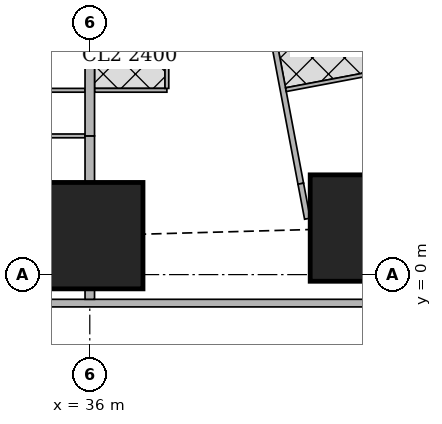
"""IFC4 building model, lengths in metres.
Left out: names, types, materials, properties, quantities, classifications, styles, units other than length and angle.
Written with IfcOpenShell. Run it as: python <this file> out.ifc"""

import sys

from ifc_helpers import new_model, si_unit, direction, frame, frame_2d, origin, origin_2d, place, context, subcontext, project, spatial, rectangle, extrude, element, fill, save


model = new_model("IFC4")
c1 = context("Model", 3, precision=1e-05, world=origin(), true_north=direction((0.0, 1.0)))
c2 = subcontext(c1, "Body", "Model", "MODEL_VIEW")
j1 = project(units=[si_unit("LENGTHUNIT", "METRE"), si_unit("PLANEANGLEUNIT", "RADIAN")], contexts=[c1])
p1 = place(None, origin())
s1 = spatial("IfcSite", under=j1, at=p1, CompositionType="ELEMENT")
p2 = place(p1, origin())
s2 = spatial("IfcBuilding", under=s1, at=p2, CompositionType="ELEMENT")
p3 = place(p2, frame((0.0, 0.0, 31.25)))
s3 = spatial("IfcBuildingStorey", under=s2, at=p3, CompositionType="ELEMENT", Elevation=31.25)
for number, where, z_axis, x_axis in (
    (1, (36.0, 1.025, 0.0), (0.0, 0.0, 1.0), (1.0, 0.0, 0.0)),
    (2, (43.2, 1.225, 0.0), (0.0, 0.0, 1.0), (1.0, 0.0, 0.0)),
):
    element("IfcColumn", number, at=place(p3, frame(where, z_axis=z_axis, x_axis=x_axis)), inside=s3, PredefinedType="COLUMN", context=c2, shape_type="SweptSolid", body=[
        extrude(rectangle(XDim=2.8, YDim=2.8, at=origin_2d()), origin(), (0.0, 0.0, 1.0), 3.75),
    ])
p4 = place(p3, frame((2.163, -0.75, 0.0), z_axis=(0.0, 0.0, 1.0), x_axis=(1.0, 0.0, 0.0)))
e3 = element("IfcWall", 3, at=p4, inside=s3, PredefinedType="SOLIDWALL", context=c2, shape_type="SweptSolid", body=[
    extrude(rectangle(XDim=45.628, YDim=0.2, at=frame_2d((22.814, 0.0))), origin(), (0.0, 0.0, 1.0), 3.5),
])
p5 = place(p4, frame((9.537, 0.0, 0.9)))
e4 = element("IfcOpeningElement", 4, at=p5, cuts=e3, PredefinedType="OPENING", context=c2, shape_type="SweptSolid", body=[
    extrude(rectangle(XDim=1.8, YDim=1.5, at=frame_2d((0.9, 0.75))), frame((0.0, 0.11, 0.0), z_axis=(0.0, -1.0, 0.0), x_axis=(1.0, 0.0, 0.0)), (0.0, 0.0, 1.0), 0.22),
])
p6 = place(p4, frame((13.137, 0.0, 0.9)))
e5 = element("IfcOpeningElement", 5, at=p6, cuts=e3, PredefinedType="OPENING", context=c2, shape_type="SweptSolid", body=[
    extrude(rectangle(XDim=1.8, YDim=1.5, at=frame_2d((0.9, 0.75))), frame((0.0, 0.11, 0.0), z_axis=(0.0, -1.0, 0.0), x_axis=(1.0, 0.0, 0.0)), (0.0, 0.0, 1.0), 0.22),
])
p7 = place(p4, frame((16.737, 0.0, 0.9)))
e6 = element("IfcOpeningElement", 6, at=p7, cuts=e3, PredefinedType="OPENING", context=c2, shape_type="SweptSolid", body=[
    extrude(rectangle(XDim=1.8, YDim=1.5, at=frame_2d((0.9, 0.75))), frame((0.0, 0.11, 0.0), z_axis=(0.0, -1.0, 0.0), x_axis=(1.0, 0.0, 0.0)), (0.0, 0.0, 1.0), 0.22),
])
p8 = place(p4, frame((20.337, 0.0, 0.9)))
e7 = element("IfcOpeningElement", 7, at=p8, cuts=e3, PredefinedType="OPENING", context=c2, shape_type="SweptSolid", body=[
    extrude(rectangle(XDim=1.8, YDim=1.5, at=frame_2d((0.9, 0.75))), frame((0.0, 0.11, 0.0), z_axis=(0.0, -1.0, 0.0), x_axis=(1.0, 0.0, 0.0)), (0.0, 0.0, 1.0), 0.22),
])
p9 = place(p4, frame((23.937, 0.0, 0.9)))
e8 = element("IfcOpeningElement", 8, at=p9, cuts=e3, PredefinedType="OPENING", context=c2, shape_type="SweptSolid", body=[
    extrude(rectangle(XDim=1.8, YDim=1.5, at=frame_2d((0.9, 0.75))), frame((0.0, 0.11, 0.0), z_axis=(0.0, -1.0, 0.0), x_axis=(1.0, 0.0, 0.0)), (0.0, 0.0, 1.0), 0.22),
])
p10 = place(p4, frame((27.537, 0.0, 0.9)))
e9 = element("IfcOpeningElement", 9, at=p10, cuts=e3, PredefinedType="OPENING", context=c2, shape_type="SweptSolid", body=[
    extrude(rectangle(XDim=1.8, YDim=1.5, at=frame_2d((0.9, 0.75))), frame((0.0, 0.11, 0.0), z_axis=(0.0, -1.0, 0.0), x_axis=(1.0, 0.0, 0.0)), (0.0, 0.0, 1.0), 0.22),
])
p11 = place(p4, frame((31.137, 0.0, 0.9)))
e10 = element("IfcOpeningElement", 10, at=p11, cuts=e3, PredefinedType="OPENING", context=c2, shape_type="SweptSolid", body=[
    extrude(rectangle(XDim=1.8, YDim=1.5, at=frame_2d((0.9, 0.75))), frame((0.0, 0.11, 0.0), z_axis=(0.0, -1.0, 0.0), x_axis=(1.0, 0.0, 0.0)), (0.0, 0.0, 1.0), 0.22),
])
p12 = place(p4, frame((34.737, 0.0, 0.9)))
e11 = element("IfcOpeningElement", 11, at=p12, cuts=e3, PredefinedType="OPENING", context=c2, shape_type="SweptSolid", body=[
    extrude(rectangle(XDim=1.8, YDim=1.5, at=frame_2d((0.9, 0.75))), frame((0.0, 0.11, 0.0), z_axis=(0.0, -1.0, 0.0), x_axis=(1.0, 0.0, 0.0)), (0.0, 0.0, 1.0), 0.22),
])
p13 = place(p3, frame((50.653, 2.703, 0.0), z_axis=(0.0, 0.0, 1.0), x_axis=(-0.185612026696, 0.982623109613, 0.0)))
e12 = element("IfcWall", 12, at=p13, inside=s3, PredefinedType="SOLIDWALL", context=c2, shape_type="SweptSolid", body=[
    extrude(rectangle(XDim=41.393, YDim=0.2, at=frame_2d((20.697, 0.0))), origin(), (0.0, 0.0, 1.0), 3.5),
])
p14 = place(p13, frame((1.633, 0.0, 0.9)))
e13 = element("IfcOpeningElement", 13, at=p14, cuts=e12, PredefinedType="OPENING", context=c2, shape_type="SweptSolid", body=[
    extrude(rectangle(XDim=1.8, YDim=1.5, at=frame_2d((0.9, 0.75))), frame((0.0, 0.11, 0.0), z_axis=(0.0, -1.0, 0.0), x_axis=(1.0, 0.0, 0.0)), (0.0, 0.0, 1.0), 0.22),
])
p15 = place(p13, frame((6.032, 0.0, 0.9)))
e14 = element("IfcOpeningElement", 14, at=p15, cuts=e12, PredefinedType="OPENING", context=c2, shape_type="SweptSolid", body=[
    extrude(rectangle(XDim=1.8, YDim=1.5, at=frame_2d((0.9, 0.75))), frame((0.0, 0.11, 0.0), z_axis=(0.0, -1.0, 0.0), x_axis=(1.0, 0.0, 0.0)), (0.0, 0.0, 1.0), 0.22),
])
p16 = place(p13, frame((9.848, 0.0, 0.9)))
e15 = element("IfcOpeningElement", 15, at=p16, cuts=e12, PredefinedType="OPENING", context=c2, shape_type="SweptSolid", body=[
    extrude(rectangle(XDim=1.8, YDim=1.5, at=frame_2d((0.9, 0.75))), frame((0.0, 0.11, 0.0), z_axis=(0.0, -1.0, 0.0), x_axis=(1.0, 0.0, 0.0)), (0.0, 0.0, 1.0), 0.22),
])
p17 = place(p13, frame((17.481, 0.0, 0.9)))
e16 = element("IfcOpeningElement", 16, at=p17, cuts=e12, PredefinedType="OPENING", context=c2, shape_type="SweptSolid", body=[
    extrude(rectangle(XDim=1.8, YDim=1.5, at=frame_2d((0.9, 0.75))), frame((0.0, 0.11, 0.0), z_axis=(0.0, -1.0, 0.0), x_axis=(1.0, 0.0, 0.0)), (0.0, 0.0, 1.0), 0.22),
])
p18 = place(p13, frame((21.297, 0.0, 0.9)))
e17 = element("IfcOpeningElement", 17, at=p18, cuts=e12, PredefinedType="OPENING", context=c2, shape_type="SweptSolid", body=[
    extrude(rectangle(XDim=1.8, YDim=1.5, at=frame_2d((0.9, 0.75))), frame((0.0, 0.11, 0.0), z_axis=(0.0, -1.0, 0.0), x_axis=(1.0, 0.0, 0.0)), (0.0, 0.0, 1.0), 0.22),
])
p19 = place(p13, frame((25.113, 0.0, 0.9)))
e18 = element("IfcOpeningElement", 18, at=p19, cuts=e12, PredefinedType="OPENING", context=c2, shape_type="SweptSolid", body=[
    extrude(rectangle(XDim=1.8, YDim=1.5, at=frame_2d((0.9, 0.75))), frame((0.0, 0.11, 0.0), z_axis=(0.0, -1.0, 0.0), x_axis=(1.0, 0.0, 0.0)), (0.0, 0.0, 1.0), 0.22),
])
p20 = place(p13, frame((28.93, 0.0, 0.9)))
e19 = element("IfcOpeningElement", 19, at=p20, cuts=e12, PredefinedType="OPENING", context=c2, shape_type="SweptSolid", body=[
    extrude(rectangle(XDim=1.8, YDim=1.5, at=frame_2d((0.9, 0.75))), frame((0.0, 0.11, 0.0), z_axis=(0.0, -1.0, 0.0), x_axis=(1.0, 0.0, 0.0)), (0.0, 0.0, 1.0), 0.22),
])
p21 = place(p13, frame((32.746, 0.0, 0.9)))
e20 = element("IfcOpeningElement", 20, at=p21, cuts=e12, PredefinedType="OPENING", context=c2, shape_type="SweptSolid", body=[
    extrude(rectangle(XDim=1.8, YDim=1.5, at=frame_2d((0.9, 0.75))), frame((0.0, 0.11, 0.0), z_axis=(0.0, -1.0, 0.0), x_axis=(1.0, 0.0, 0.0)), (0.0, 0.0, 1.0), 0.22),
])
p22 = place(p13, frame((36.481, 0.0, 0.9)))
e21 = element("IfcOpeningElement", 21, at=p22, cuts=e12, PredefinedType="OPENING", context=c2, shape_type="SweptSolid", body=[
    extrude(rectangle(XDim=1.8, YDim=1.5, at=frame_2d((0.9, 0.75))), frame((0.0, 0.11, 0.0), z_axis=(0.0, -1.0, 0.0), x_axis=(1.0, 0.0, 0.0)), (0.0, 0.0, 1.0), 0.22),
])
p23 = place(p3, frame((35.094, 36.585, 0.0), z_axis=(0.0, 0.0, 1.0), x_axis=(0.185588860311, -0.982627485331, 0.0)))
e22 = element("IfcWall", 22, at=p23, inside=s3, PredefinedType="SOLIDWALL", context=c2, shape_type="SweptSolid", body=[
    extrude(rectangle(XDim=34.797, YDim=0.15, at=frame_2d((17.399, 0.0))), origin(), (0.0, 0.0, 1.0), 2.5),
])
p24 = place(p23, frame((6.012, 0.0, 0.0)))
e23 = element("IfcOpeningElement", 23, at=p24, cuts=e22, PredefinedType="OPENING", context=c2, shape_type="SweptSolid", body=[
    extrude(rectangle(XDim=1.0, YDim=2.1, at=frame_2d((0.5, 1.05))), frame((0.0, 0.085, 0.0), z_axis=(0.0, -1.0, 0.0), x_axis=(1.0, 0.0, 0.0)), (0.0, 0.0, 1.0), 0.17),
])
p25 = place(p23, frame((9.828, 0.0, 0.0)))
e24 = element("IfcOpeningElement", 24, at=p25, cuts=e22, PredefinedType="OPENING", context=c2, shape_type="SweptSolid", body=[
    extrude(rectangle(XDim=1.0, YDim=2.1, at=frame_2d((0.5, 1.05))), frame((0.0, 0.085, 0.0), z_axis=(0.0, -1.0, 0.0), x_axis=(1.0, 0.0, 0.0)), (0.0, 0.0, 1.0), 0.17),
])
p26 = place(p23, frame((25.9, 0.0, 0.0)))
e25 = element("IfcOpeningElement", 25, at=p26, cuts=e22, PredefinedType="OPENING", context=c2, shape_type="SweptSolid", body=[
    extrude(rectangle(XDim=1.0, YDim=2.1, at=frame_2d((0.5, 1.05))), frame((0.0, 0.085, 0.0), z_axis=(0.0, -1.0, 0.0), x_axis=(1.0, 0.0, 0.0)), (0.0, 0.0, 1.0), 0.17),
])
p27 = place(p3, frame((41.552, 2.392, 0.0), z_axis=(0.0, 0.0, 1.0), x_axis=(0.185687800081, -0.982608793417, 0.0)))
e26 = element("IfcWall", 26, at=p27, inside=s3, PredefinedType="SOLIDWALL", context=c2, shape_type="SweptSolid", body=[
    extrude(rectangle(XDim=0.938, YDim=0.15, at=frame_2d((0.469, 0.0))), origin(), (0.0, 0.0, 1.0), 2.05),
])
p28 = place(p3, frame((35.875, 3.65, 0.0), z_axis=(0.0, 0.0, 1.0), x_axis=(-1.0, 0.0, 0.0)))
e27 = element("IfcWall", 27, at=p28, inside=s3, PredefinedType="PARTITIONING", context=c2, shape_type="SweptSolid", body=[
    extrude(rectangle(XDim=7.075, YDim=0.1, at=frame_2d((3.538, 0.0))), origin(), (0.0, 0.0, 1.0), 3.5),
])
p29 = place(p28, frame((4.75, 0.0, 0.0)))
e28 = element("IfcOpeningElement", 28, at=p29, cuts=e27, PredefinedType="OPENING", context=c2, shape_type="SweptSolid", body=[
    extrude(rectangle(XDim=0.9, YDim=2.1, at=frame_2d((0.45, 1.05))), frame((0.0, 0.06, 0.0), z_axis=(0.0, -1.0, 0.0), x_axis=(1.0, 0.0, 0.0)), (0.0, 0.0, 1.0), 0.12),
])
p30 = place(p28, frame((2.375, 0.0, 0.0)))
e29 = element("IfcOpeningElement", 29, at=p30, cuts=e27, PredefinedType="OPENING", context=c2, shape_type="SweptSolid", body=[
    extrude(rectangle(XDim=0.9, YDim=2.1, at=frame_2d((0.45, 1.05))), frame((0.0, 0.06, 0.0), z_axis=(0.0, -1.0, 0.0), x_axis=(1.0, 0.0, 0.0)), (0.0, 0.0, 1.0), 0.12),
])
p31 = place(p3, frame((35.875, 4.85, 0.0), z_axis=(0.0, 0.0, 1.0), x_axis=(-1.0, 0.0, 0.0)))
e30 = element("IfcWall", 30, at=p31, inside=s3, PredefinedType="PARTITIONING", context=c2, shape_type="SweptSolid", body=[
    extrude(rectangle(XDim=7.075, YDim=0.1, at=frame_2d((3.538, 0.0))), origin(), (0.0, 0.0, 1.0), 3.5),
])
p32 = place(p31, frame((5.52, 0.0, 0.0)))
e31 = element("IfcOpeningElement", 31, at=p32, cuts=e30, PredefinedType="OPENING", context=c2, shape_type="SweptSolid", body=[
    extrude(rectangle(XDim=0.9, YDim=2.1, at=frame_2d((0.45, 1.05))), frame((0.0, 0.06, 0.0), z_axis=(0.0, -1.0, 0.0), x_axis=(1.0, 0.0, 0.0)), (0.0, 0.0, 1.0), 0.12),
])
p33 = place(p31, frame((2.225, 0.0, 0.0)))
e32 = element("IfcOpeningElement", 32, at=p33, cuts=e30, PredefinedType="OPENING", context=c2, shape_type="SweptSolid", body=[
    extrude(rectangle(XDim=0.9, YDim=2.1, at=frame_2d((0.45, 1.05))), frame((0.0, 0.06, 0.0), z_axis=(0.0, -1.0, 0.0), x_axis=(1.0, 0.0, 0.0)), (0.0, 0.0, 1.0), 0.12),
])
p34 = place(p31, frame((3.72, 0.0, 0.0)))
e33 = element("IfcOpeningElement", 33, at=p34, cuts=e30, PredefinedType="OPENING", context=c2, shape_type="SweptSolid", body=[
    extrude(rectangle(XDim=0.9, YDim=2.1, at=frame_2d((0.45, 1.05))), frame((0.0, 0.06, 0.0), z_axis=(0.0, -1.0, 0.0), x_axis=(1.0, 0.0, 0.0)), (0.0, 0.0, 1.0), 0.12),
])
p35 = place(p31, frame((0.425, 0.0, 0.0)))
e34 = element("IfcOpeningElement", 34, at=p35, cuts=e30, PredefinedType="OPENING", context=c2, shape_type="SweptSolid", body=[
    extrude(rectangle(XDim=0.9, YDim=2.1, at=frame_2d((0.45, 1.05))), frame((0.0, 0.06, 0.0), z_axis=(0.0, -1.0, 0.0), x_axis=(1.0, 0.0, 0.0)), (0.0, 0.0, 1.0), 0.12),
])
p36 = place(p3, frame((38.029, 4.85, 0.0), z_axis=(0.0, 0.0, 1.0), x_axis=(-1.0, 0.0, 0.0)))
e35 = element("IfcWall", 35, at=p36, inside=s3, PredefinedType="PARTITIONING", context=c2, shape_type="SweptSolid", body=[
    extrude(rectangle(XDim=1.904, YDim=0.1, at=frame_2d((0.952, 0.0))), origin(), (0.0, 0.0, 1.0), 3.5),
])
p37 = place(p36, frame((0.579, 0.0, 0.0)))
e36 = element("IfcOpeningElement", 36, at=p37, cuts=e35, PredefinedType="OPENING", context=c2, shape_type="SweptSolid", body=[
    extrude(rectangle(XDim=0.9, YDim=2.1, at=frame_2d((0.45, 1.05))), frame((0.0, 0.06, 0.0), z_axis=(0.0, -1.0, 0.0), x_axis=(1.0, 0.0, 0.0)), (0.0, 0.0, 1.0), 0.12),
])
p38 = place(p3, frame((38.029, 4.9, 0.0), z_axis=(0.0, 0.0, 1.0), x_axis=(0.0, 1.0, 0.0)))
e37 = element("IfcWall", 37, at=p38, inside=s3, PredefinedType="PARTITIONING", context=c2, shape_type="SweptSolid", body=[
    extrude(rectangle(XDim=3.275, YDim=0.1, at=frame_2d((1.638, 0.0))), origin(), (0.0, 0.0, 1.0), 3.5),
])
p39 = place(p3, frame((36.0, -0.65, 0.0), z_axis=(0.0, 0.0, 1.0), x_axis=(0.0, 1.0, 0.0)))
e38 = element("IfcWall", 38, at=p39, inside=s3, PredefinedType="SOLIDWALL", context=c2, shape_type="SweptSolid", body=[
    extrude(rectangle(XDim=0.274, YDim=0.25, at=frame_2d((0.137, 0.0))), origin(), (0.0, 0.0, 1.0), 3.5),
])
p40 = place(p3, frame((36.0, 2.426, 0.0), z_axis=(0.0, 0.0, 1.0), x_axis=(0.0, 1.0, 0.0)))
e39 = element("IfcWall", 39, at=p40, inside=s3, PredefinedType="SOLIDWALL", context=c2, shape_type="SweptSolid", body=[
    extrude(rectangle(XDim=1.224, YDim=0.25, at=frame_2d((0.612, 0.0))), origin(), (0.0, 0.0, 1.0), 3.5),
])
p41 = place(p3, frame((36.0, 3.65, 0.0), z_axis=(0.0, 0.0, 1.0), x_axis=(0.0, 1.0, 0.0)))
e40 = element("IfcWall", 40, at=p41, inside=s3, PredefinedType="SOLIDWALL", context=c2, shape_type="SweptSolid", body=[
    extrude(rectangle(XDim=2.949, YDim=0.25, at=frame_2d((1.475, 0.0))), origin(), (0.0, 0.0, 1.0), 3.5),
])
p42 = place(p3, frame((44.379, 5.474, 0.0), z_axis=(0.0, 0.0, 1.0), x_axis=(-0.982607026909, -0.185697147715, 0.0)))
e41 = element("IfcWall", 41, at=p42, inside=s3, PredefinedType="PARTITIONING", context=c2, shape_type="SweptSolid", body=[
    extrude(rectangle(XDim=3.275, YDim=0.1, at=frame_2d((1.637, 0.0))), origin(), (0.0, 0.0, 1.0), 3.5),
])
p43 = place(p11, origin())
e42 = element("IfcWindow", 42, at=p43, inside=s3, PartitioningType="SINGLE_PANEL", PredefinedType="WINDOW", context=c2, shape_type="SweptSolid", body=[
    extrude(rectangle(XDim=1.8, YDim=1.5, at=frame_2d((0.9, 0.75))), frame((0.0, 0.03, 0.0), z_axis=(0.0, -1.0, 0.0), x_axis=(1.0, 0.0, 0.0)), (0.0, 0.0, 1.0), 0.06),
])
fill(e10, e42)
p44 = place(p12, origin())
e43 = element("IfcWindow", 43, at=p44, inside=s3, PartitioningType="SINGLE_PANEL", PredefinedType="WINDOW", context=c2, shape_type="SweptSolid", body=[
    extrude(rectangle(XDim=1.8, YDim=1.5, at=frame_2d((0.9, 0.75))), frame((0.0, 0.03, 0.0), z_axis=(0.0, -1.0, 0.0), x_axis=(1.0, 0.0, 0.0)), (0.0, 0.0, 1.0), 0.06),
])
fill(e11, e43)
p45 = place(p35, origin())
e44 = element("IfcDoor", 44, at=p45, inside=s3, OperationType="SINGLE_SWING_RIGHT", PredefinedType="DOOR", context=c2, shape_type="SweptSolid", body=[
    extrude(rectangle(XDim=0.9, YDim=2.1, at=frame_2d((0.45, 1.05))), frame((0.0, 0.025, 0.0), z_axis=(0.0, -1.0, 0.0), x_axis=(1.0, 0.0, 0.0)), (0.0, 0.0, 1.0), 0.05),
])
fill(e34, e44)
p46 = place(p37, origin())
e45 = element("IfcDoor", 45, at=p46, inside=s3, OperationType="SINGLE_SWING_LEFT", PredefinedType="DOOR", context=c2, shape_type="SweptSolid", body=[
    extrude(rectangle(XDim=0.9, YDim=2.1, at=frame_2d((0.45, 1.05))), frame((0.0, 0.025, 0.0), z_axis=(0.0, -1.0, 0.0), x_axis=(1.0, 0.0, 0.0)), (0.0, 0.0, 1.0), 0.05),
])
fill(e36, e45)
save(model, sys.argv[1])
